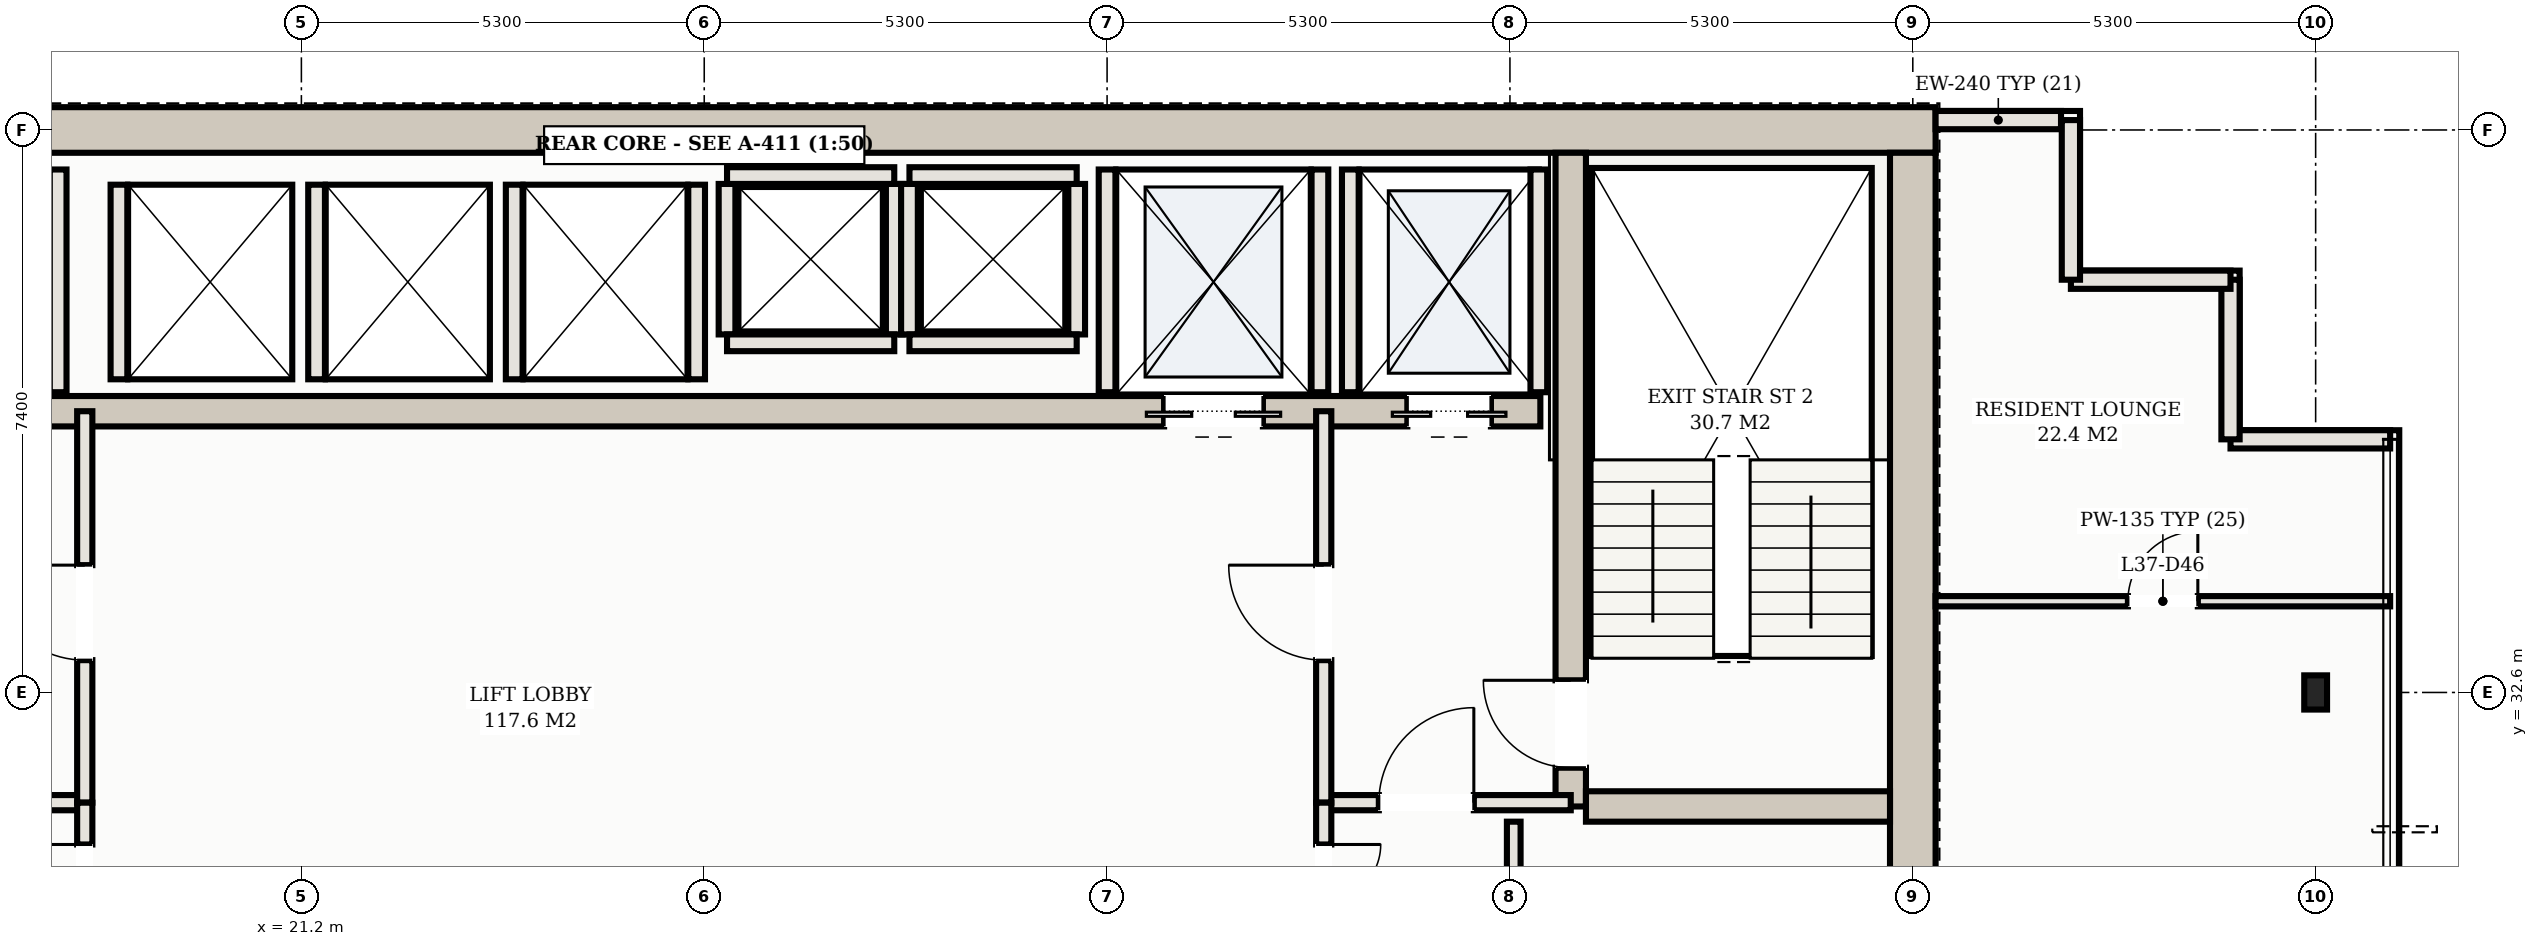
"""IFC4 building model, lengths in metres.
Left out: names, types, materials, properties, quantities, classifications, styles, units other than length and angle.
Written with IfcOpenShell. Run it as: python <this file> out.ifc"""

import sys

from ifc_helpers import new_model, si_unit, direction, frame, frame_2d, origin, origin_2d, place, context, subcontext, project, spatial, rectangle, hollow_rectangle, extrude, element, fill, save


model = new_model("IFC4")
c1 = context("Model", 3, precision=1e-05, world=origin(), true_north=direction((0.0, 1.0)))
c2 = subcontext(c1, "Body", "Model", "MODEL_VIEW")
j1 = project(units=[si_unit("LENGTHUNIT", "METRE"), si_unit("PLANEANGLEUNIT", "RADIAN")], contexts=[c1])
p1 = place(None, origin())
s1 = spatial("IfcSite", under=j1, at=p1, CompositionType="ELEMENT")
p2 = place(p1, origin())
s2 = spatial("IfcBuilding", under=s1, at=p2, CompositionType="ELEMENT")
p3 = place(p2, frame((0.0, 0.0, 139.2)))
s3 = spatial("IfcBuildingStorey", under=s2, at=p3, CompositionType="ELEMENT", Elevation=139.2)
p4 = place(p3, frame((10.3, 40.0, 0.0), z_axis=(0.0, 0.0, 1.0), x_axis=(1.0, 0.0, 0.0)))
e1 = element("IfcWall", 1, at=p4, inside=s3, PredefinedType="SHEAR", context=c2, shape_type="SweptSolid", body=[
    extrude(rectangle(XDim=32.4, YDim=0.6, at=frame_2d((16.2, 0.0))), origin(), (0.0, 0.0, 1.0), 3.1),
])
p5 = place(p3, frame((42.4, 25.5, 0.0), z_axis=(0.0, 0.0, 1.0), x_axis=(0.0, 1.0, 0.0)))
e2 = element("IfcWall", 2, at=p5, inside=s3, PredefinedType="SHEAR", context=c2, shape_type="SweptSolid", body=[
    extrude(rectangle(XDim=14.2, YDim=0.6, at=frame_2d((7.1, 0.0))), origin(), (0.0, 0.0, 1.0), 3.1),
])
p6 = place(p3, frame((37.9, 31.1, 0.0), z_axis=(0.0, 0.0, 1.0), x_axis=(0.0, 1.0, 0.0)))
e3 = element("IfcWall", 3, at=p6, inside=s3, PredefinedType="SHEAR", context=c2, shape_type="SweptSolid", body=[
    extrude(rectangle(XDim=8.6, YDim=0.4, at=frame_2d((4.3, 0.0))), origin(), (0.0, 0.0, 1.0), 3.1),
])
p7 = place(p6, frame((0.51, 0.0, 0.0)))
e4 = element("IfcOpeningElement", 4, at=p7, cuts=e3, PredefinedType="OPENING", context=c2, shape_type="SweptSolid", body=[
    extrude(rectangle(XDim=1.15, YDim=2.2, at=frame_2d((0.575, 1.1))), frame((0.0, 0.21, 0.0), z_axis=(0.0, -1.0, 0.0), x_axis=(1.0, 0.0, 0.0)), (0.0, 0.0, 1.0), 0.42),
])
p8 = place(p3, frame((38.1, 31.1, 0.0), z_axis=(0.0, 0.0, 1.0), x_axis=(1.0, 0.0, 0.0)))
e5 = element("IfcWall", 5, at=p8, inside=s3, PredefinedType="SHEAR", context=c2, shape_type="SweptSolid", body=[
    extrude(rectangle(XDim=4.0, YDim=0.4, at=frame_2d((2.0, 0.0))), origin(), (0.0, 0.0, 1.0), 3.1),
])
p9 = place(p3, frame((15.5, 36.3, 0.0), z_axis=(0.0, 0.0, 1.0), x_axis=(1.0, 0.0, 0.0)))
e6 = element("IfcWall", 6, at=p9, inside=s3, PredefinedType="SHEAR", context=c2, shape_type="SweptSolid", body=[
    extrude(rectangle(XDim=22.0, YDim=0.4, at=frame_2d((11.0, 0.0))), origin(), (0.0, 0.0, 1.0), 3.1),
])
p10 = place(p9, frame((0.65, 0.0, 0.0)))
e7 = element("IfcOpeningElement", 7, at=p10, cuts=e6, PredefinedType="OPENING", context=c2, shape_type="SweptSolid", body=[
    extrude(rectangle(XDim=1.1, YDim=2.15, at=frame_2d((0.55, 1.075))), frame((0.0, 0.21, 0.0), z_axis=(0.0, -1.0, 0.0), x_axis=(1.0, 0.0, 0.0)), (0.0, 0.0, 1.0), 0.42),
])
p11 = place(p9, frame((20.25, 0.0, 0.0)))
e8 = element("IfcOpeningElement", 8, at=p11, cuts=e6, PredefinedType="OPENING", context=c2, shape_type="SweptSolid", body=[
    extrude(rectangle(XDim=1.1, YDim=2.15, at=frame_2d((0.55, 1.075))), frame((0.0, 0.21, 0.0), z_axis=(0.0, -1.0, 0.0), x_axis=(1.0, 0.0, 0.0)), (0.0, 0.0, 1.0), 0.42),
])
p12 = place(p9, frame((17.05, 0.0, 0.0)))
e9 = element("IfcOpeningElement", 9, at=p12, cuts=e6, PredefinedType="OPENING", context=c2, shape_type="SweptSolid", body=[
    extrude(rectangle(XDim=1.3, YDim=2.2, at=frame_2d((0.65, 1.1))), frame((0.0, 0.21, 0.0), z_axis=(0.0, -1.0, 0.0), x_axis=(1.0, 0.0, 0.0)), (0.0, 0.0, 1.0), 0.42),
])
p13 = place(p3, frame((47.7, 32.6, 0.0), z_axis=(0.0, 0.0, 1.0), x_axis=(1.0, 0.0, 0.0)))
e10 = element("IfcColumn", 10, at=p13, inside=s3, PredefinedType="COLUMN", context=c2, shape_type="SweptSolid", body=[
    extrude(hollow_rectangle(XDim=0.3, YDim=0.45, WallThickness=0.016, at=origin_2d()), origin(), (0.0, 0.0, 1.0), 3.3),
])
for number, where, z_axis, x_axis in (
    (11, (18.0, 36.55, 0.0), (0.0, 0.0, 1.0), (0.0, 1.0, 0.0)),
    (12, (35.0, 36.55, 0.0), (0.0, 0.0, 1.0), (0.0, 1.0, 0.0)),
    (13, (37.48, 36.55, 0.0), (0.0, 0.0, 1.0), (0.0, 1.0, 0.0)),
    (14, (31.8, 36.55, 0.0), (0.0, 0.0, 1.0), (0.0, 1.0, 0.0)),
    (15, (34.6, 36.55, 0.0), (0.0, 0.0, 1.0), (0.0, 1.0, 0.0)),
):
    element("IfcWall", number, at=place(p3, frame(where, z_axis=z_axis, x_axis=x_axis)), inside=s3, PredefinedType="SOLIDWALL", context=c2, shape_type="SweptSolid", body=[
        extrude(rectangle(XDim=2.93, YDim=0.22, at=frame_2d((1.465, 0.0))), origin(), (0.0, 0.0, 1.0), 3.1),
    ])
for number, where, z_axis, x_axis in (
    (16, (18.8, 36.72, 0.0), (0.0, 0.0, 1.0), (0.0, 1.0, 0.0)),
    (17, (21.4, 36.72, 0.0), (0.0, 0.0, 1.0), (0.0, 1.0, 0.0)),
    (18, (24.0, 36.72, 0.0), (0.0, 0.0, 1.0), (0.0, 1.0, 0.0)),
    (19, (26.4, 36.72, 0.0), (0.0, 0.0, 1.0), (0.0, 1.0, 0.0)),
):
    element("IfcWall", number, at=place(p3, frame(where, z_axis=z_axis, x_axis=x_axis)), inside=s3, PredefinedType="SOLIDWALL", context=c2, shape_type="SweptSolid", body=[
        extrude(rectangle(XDim=2.56, YDim=0.22, at=frame_2d((1.28, 0.0))), origin(), (0.0, 0.0, 1.0), 3.1),
    ])
for number, where, z_axis, x_axis in (
    (20, (26.8, 37.31, 0.0), (0.0, 0.0, 1.0), (0.0, 1.0, 0.0)),
    (21, (29.0, 37.31, 0.0), (0.0, 0.0, 1.0), (0.0, 1.0, 0.0)),
):
    element("IfcWall", number, at=place(p3, frame(where, z_axis=z_axis, x_axis=x_axis)), inside=s3, PredefinedType="SOLIDWALL", context=c2, shape_type="SweptSolid", body=[
        extrude(rectangle(XDim=1.98, YDim=0.22, at=frame_2d((0.99, 0.0))), origin(), (0.0, 0.0, 1.0), 3.1),
    ])
for number, where, z_axis, x_axis in (
    (22, (26.8, 39.4, 0.0), (0.0, 0.0, 1.0), (1.0, 0.0, 0.0)),
    (23, (26.8, 37.2, 0.0), (0.0, 0.0, 1.0), (1.0, 0.0, 0.0)),
):
    element("IfcWall", number, at=place(p3, frame(where, z_axis=z_axis, x_axis=x_axis)), inside=s3, PredefinedType="SOLIDWALL", context=c2, shape_type="SweptSolid", body=[
        extrude(rectangle(XDim=2.2, YDim=0.22, at=frame_2d((1.1, 0.0))), origin(), (0.0, 0.0, 1.0), 3.1),
    ])
for number, where, z_axis, x_axis in (
    (24, (29.2, 37.31, 0.0), (0.0, 0.0, 1.0), (0.0, 1.0, 0.0)),
    (25, (31.4, 37.31, 0.0), (0.0, 0.0, 1.0), (0.0, 1.0, 0.0)),
):
    element("IfcWall", number, at=place(p3, frame(where, z_axis=z_axis, x_axis=x_axis)), inside=s3, PredefinedType="SOLIDWALL", context=c2, shape_type="SweptSolid", body=[
        extrude(rectangle(XDim=1.98, YDim=0.22, at=frame_2d((0.99, 0.0))), origin(), (0.0, 0.0, 1.0), 3.1),
    ])
for number, where, z_axis, x_axis in (
    (26, (29.2, 39.4, 0.0), (0.0, 0.0, 1.0), (1.0, 0.0, 0.0)),
    (27, (29.2, 37.2, 0.0), (0.0, 0.0, 1.0), (1.0, 0.0, 0.0)),
):
    element("IfcWall", number, at=place(p3, frame(where, z_axis=z_axis, x_axis=x_axis)), inside=s3, PredefinedType="SOLIDWALL", context=c2, shape_type="SweptSolid", body=[
        extrude(rectangle(XDim=2.2, YDim=0.22, at=frame_2d((1.1, 0.0))), origin(), (0.0, 0.0, 1.0), 3.1),
    ])
p14 = place(p3, frame((48.68, 35.93, 0.0), z_axis=(0.0, 0.0, 1.0), x_axis=(-1.0, 0.0, 0.0)))
e28 = element("IfcWall", 28, at=p14, inside=s3, PredefinedType="SOLIDWALL", context=c2, shape_type="SweptSolid", body=[
    extrude(rectangle(XDim=2.1, YDim=0.24, at=frame_2d((1.05, 0.0))), origin(), (0.0, 0.0, 1.0), 3.1),
])
for number, where, z_axis, x_axis in (
    (29, (46.58, 35.93, 0.0), (0.0, 0.0, 1.0), (0.0, 1.0, 0.0)),
    (30, (46.58, 38.03, 0.0), (0.0, 0.0, 1.0), (-1.0, 0.0, 0.0)),
):
    element("IfcWall", number, at=place(p3, frame(where, z_axis=z_axis, x_axis=x_axis)), inside=s3, PredefinedType="SOLIDWALL", context=c2, shape_type="SweptSolid", body=[
        extrude(rectangle(XDim=2.1, YDim=0.24, at=frame_2d((1.05, 0.0))), origin(), (0.0, 0.0, 1.0), 3.1),
    ])
p15 = place(p3, frame((44.48, 38.03, 0.0), z_axis=(0.0, 0.0, 1.0), x_axis=(0.0, 1.0, 0.0)))
e31 = element("IfcWall", 31, at=p15, inside=s3, PredefinedType="SOLIDWALL", context=c2, shape_type="SweptSolid", body=[
    extrude(rectangle(XDim=2.1, YDim=0.24, at=frame_2d((1.05, 0.0))), origin(), (0.0, 0.0, 1.0), 3.1),
])
p16 = place(p3, frame((44.35, 40.13, 0.0), z_axis=(0.0, 0.0, 1.0), x_axis=(-1.0, 0.0, 0.0)))
e32 = element("IfcWall", 32, at=p16, inside=s3, PredefinedType="SOLIDWALL", context=c2, shape_type="SweptSolid", body=[
    extrude(rectangle(XDim=1.65, YDim=0.24, at=frame_2d((0.825, 0.0))), origin(), (0.0, 0.0, 1.0), 3.1),
])
p17 = place(p3, frame((15.1, 31.15, 0.0), z_axis=(0.0, 0.0, 1.0), x_axis=(1.0, 0.0, 0.0)))
e33 = element("IfcWall", 33, at=p17, inside=s3, PredefinedType="PARTITIONING", context=c2, shape_type="SweptSolid", body=[
    extrude(rectangle(XDim=3.25, YDim=0.2, at=frame_2d((1.625, 0.0))), origin(), (0.0, 0.0, 1.0), 2.38),
])
p18 = place(p17, frame((1.275, 0.0, 0.0)))
e34 = element("IfcOpeningElement", 34, at=p18, cuts=e33, PredefinedType="OPENING", context=c2, shape_type="SweptSolid", body=[
    extrude(rectangle(XDim=1.25, YDim=2.2, at=frame_2d((0.625, 1.1))), frame((0.0, 0.11, 0.0), z_axis=(0.0, -1.0, 0.0), x_axis=(1.0, 0.0, 0.0)), (0.0, 0.0, 1.0), 0.22),
])
p19 = place(p3, frame((18.35, 31.15, 0.0), z_axis=(0.0, 0.0, 1.0), x_axis=(0.0, 1.0, 0.0)))
e35 = element("IfcWall", 35, at=p19, inside=s3, PredefinedType="PARTITIONING", context=c2, shape_type="SweptSolid", body=[
    extrude(rectangle(XDim=5.15, YDim=0.2, at=frame_2d((2.575, 0.0))), origin(), (0.0, 0.0, 1.0), 2.38),
])
p20 = place(p19, frame((1.875, 0.0, 0.0)))
e36 = element("IfcOpeningElement", 36, at=p20, cuts=e35, PredefinedType="OPENING", context=c2, shape_type="SweptSolid", body=[
    extrude(rectangle(XDim=1.25, YDim=2.2, at=frame_2d((0.625, 1.1))), frame((0.0, 0.11, 0.0), z_axis=(0.0, -1.0, 0.0), x_axis=(1.0, 0.0, 0.0)), (0.0, 0.0, 1.0), 0.22),
])
p21 = place(p3, frame((34.65, 31.15, 0.0), z_axis=(0.0, 0.0, 1.0), x_axis=(1.0, 0.0, 0.0)))
e37 = element("IfcWall", 37, at=p21, inside=s3, PredefinedType="PARTITIONING", context=c2, shape_type="SweptSolid", body=[
    extrude(rectangle(XDim=3.25, YDim=0.2, at=frame_2d((1.625, 0.0))), origin(), (0.0, 0.0, 1.0), 2.38),
])
p22 = place(p21, frame((0.725, 0.0, 0.0)))
e38 = element("IfcOpeningElement", 38, at=p22, cuts=e37, PredefinedType="OPENING", context=c2, shape_type="SweptSolid", body=[
    extrude(rectangle(XDim=1.25, YDim=2.2, at=frame_2d((0.625, 1.1))), frame((0.0, 0.11, 0.0), z_axis=(0.0, -1.0, 0.0), x_axis=(1.0, 0.0, 0.0)), (0.0, 0.0, 1.0), 0.22),
])
p23 = place(p3, frame((34.65, 31.15, 0.0), z_axis=(0.0, 0.0, 1.0), x_axis=(0.0, 1.0, 0.0)))
e39 = element("IfcWall", 39, at=p23, inside=s3, PredefinedType="PARTITIONING", context=c2, shape_type="SweptSolid", body=[
    extrude(rectangle(XDim=5.15, YDim=0.2, at=frame_2d((2.575, 0.0))), origin(), (0.0, 0.0, 1.0), 2.38),
])
p24 = place(p23, frame((1.875, 0.0, 0.0)))
e40 = element("IfcOpeningElement", 40, at=p24, cuts=e39, PredefinedType="OPENING", context=c2, shape_type="SweptSolid", body=[
    extrude(rectangle(XDim=1.25, YDim=2.2, at=frame_2d((0.625, 1.1))), frame((0.0, 0.11, 0.0), z_axis=(0.0, -1.0, 0.0), x_axis=(1.0, 0.0, 0.0)), (0.0, 0.0, 1.0), 0.22),
])
p25 = place(p3, frame((37.15, 25.5, 0.0), z_axis=(0.0, 0.0, 1.0), x_axis=(0.0, 1.0, 0.0)))
e41 = element("IfcWall", 41, at=p25, inside=s3, PredefinedType="PARTITIONING", context=c2, shape_type="SweptSolid", body=[
    extrude(rectangle(XDim=5.4, YDim=0.18, at=frame_2d((2.7, 0.0))), origin(), (0.0, 0.0, 1.0), 2.38),
])
p26 = place(p25, frame((2.24, 0.0, 0.0)))
e42 = element("IfcOpeningElement", 42, at=p26, cuts=e41, PredefinedType="OPENING", context=c2, shape_type="SweptSolid", body=[
    extrude(rectangle(XDim=0.92, YDim=2.15, at=frame_2d((0.46, 1.075))), frame((0.0, 0.1, 0.0), z_axis=(0.0, -1.0, 0.0), x_axis=(1.0, 0.0, 0.0)), (0.0, 0.0, 1.0), 0.2),
])
p27 = place(p3, frame((18.35, 28.55, 0.0), z_axis=(0.0, 0.0, 1.0), x_axis=(0.0, 1.0, 0.0)))
e43 = element("IfcWall", 43, at=p27, inside=s3, PredefinedType="PARTITIONING", context=c2, shape_type="SweptSolid", body=[
    extrude(rectangle(XDim=2.6, YDim=0.2, at=frame_2d((1.3, 0.0))), origin(), (0.0, 0.0, 1.0), 2.38),
])
p28 = place(p27, frame((0.55, 0.0, 0.0)))
e44 = element("IfcOpeningElement", 44, at=p28, cuts=e43, PredefinedType="OPENING", context=c2, shape_type="SweptSolid", body=[
    extrude(rectangle(XDim=1.5, YDim=2.25, at=frame_2d((0.75, 1.125))), frame((0.0, 0.11, 0.0), z_axis=(0.0, -1.0, 0.0), x_axis=(1.0, 0.0, 0.0)), (0.0, 0.0, 1.0), 0.22),
])
p29 = place(p3, frame((34.65, 28.55, 0.0), z_axis=(0.0, 0.0, 1.0), x_axis=(0.0, 1.0, 0.0)))
e45 = element("IfcWall", 45, at=p29, inside=s3, PredefinedType="PARTITIONING", context=c2, shape_type="SweptSolid", body=[
    extrude(rectangle(XDim=2.6, YDim=0.2, at=frame_2d((1.3, 0.0))), origin(), (0.0, 0.0, 1.0), 2.38),
])
p30 = place(p29, frame((0.55, 0.0, 0.0)))
e46 = element("IfcOpeningElement", 46, at=p30, cuts=e45, PredefinedType="OPENING", context=c2, shape_type="SweptSolid", body=[
    extrude(rectangle(XDim=1.5, YDim=2.25, at=frame_2d((0.75, 1.125))), frame((0.0, 0.11, 0.0), z_axis=(0.0, -1.0, 0.0), x_axis=(1.0, 0.0, 0.0)), (0.0, 0.0, 1.0), 0.22),
])
p31 = place(p3, frame((42.7, 33.8, 0.0), z_axis=(0.0, 0.0, 1.0), x_axis=(1.0, 0.0, 0.0)))
e47 = element("IfcWall", 47, at=p31, inside=s3, PredefinedType="PARTITIONING", context=c2, shape_type="SweptSolid", body=[
    extrude(rectangle(XDim=5.98, YDim=0.135, at=frame_2d((2.99, 0.0))), origin(), (0.0, 0.0, 1.0), 2.38),
])
p32 = place(p31, frame((2.53, 0.0, 0.0)))
e48 = element("IfcOpeningElement", 48, at=p32, cuts=e47, PredefinedType="OPENING", context=c2, shape_type="SweptSolid", body=[
    extrude(rectangle(XDim=0.92, YDim=2.15, at=frame_2d((0.46, 1.075))), frame((0.0, 0.078, 0.0), z_axis=(0.0, -1.0, 0.0), x_axis=(1.0, 0.0, 0.0)), (0.0, 0.0, 1.0), 0.155),
])
p33 = place(p11, frame((1.1, 0.0, 0.0), z_axis=(0.0, 0.0, 1.0), x_axis=(-1.0, 0.0, 0.0)))
e49 = element("IfcDoor", 49, at=p33, inside=s3, OperationType="DOUBLE_DOOR_SLIDING", PredefinedType="DOOR", context=c2, shape_type="SweptSolid", body=[
    extrude(rectangle(XDim=1.1, YDim=2.15, at=frame_2d((0.55, 1.075))), frame((0.0, 0.025, 0.0), z_axis=(0.0, -1.0, 0.0), x_axis=(1.0, 0.0, 0.0)), (0.0, 0.0, 1.0), 0.05),
])
fill(e8, e49)
p34 = place(p12, frame((1.3, 0.0, 0.0), z_axis=(0.0, 0.0, 1.0), x_axis=(-1.0, 0.0, 0.0)))
e50 = element("IfcDoor", 50, at=p34, inside=s3, OperationType="DOUBLE_DOOR_SLIDING", PredefinedType="DOOR", context=c2, shape_type="SweptSolid", body=[
    extrude(rectangle(XDim=1.3, YDim=2.2, at=frame_2d((0.65, 1.1))), frame((0.0, 0.025, 0.0), z_axis=(0.0, -1.0, 0.0), x_axis=(1.0, 0.0, 0.0)), (0.0, 0.0, 1.0), 0.05),
])
fill(e9, e50)
p35 = place(p20, origin())
e51 = element("IfcDoor", 51, at=p35, inside=s3, OperationType="SINGLE_SWING_RIGHT", PredefinedType="DOOR", context=c2, shape_type="SweptSolid", body=[
    extrude(rectangle(XDim=1.25, YDim=2.2, at=frame_2d((0.625, 1.1))), frame((0.0, 0.025, 0.0), z_axis=(0.0, -1.0, 0.0), x_axis=(1.0, 0.0, 0.0)), (0.0, 0.0, 1.0), 0.05),
])
fill(e36, e51)
p36 = place(p22, origin())
e52 = element("IfcDoor", 52, at=p36, inside=s3, OperationType="SINGLE_SWING_RIGHT", PredefinedType="DOOR", context=c2, shape_type="SweptSolid", body=[
    extrude(rectangle(XDim=1.25, YDim=2.2, at=frame_2d((0.625, 1.1))), frame((0.0, 0.025, 0.0), z_axis=(0.0, -1.0, 0.0), x_axis=(1.0, 0.0, 0.0)), (0.0, 0.0, 1.0), 0.05),
])
fill(e38, e52)
p37 = place(p24, origin())
e53 = element("IfcDoor", 53, at=p37, inside=s3, OperationType="SINGLE_SWING_RIGHT", PredefinedType="DOOR", context=c2, shape_type="SweptSolid", body=[
    extrude(rectangle(XDim=1.25, YDim=2.2, at=frame_2d((0.625, 1.1))), frame((0.0, 0.025, 0.0), z_axis=(0.0, -1.0, 0.0), x_axis=(1.0, 0.0, 0.0)), (0.0, 0.0, 1.0), 0.05),
])
fill(e40, e53)
p38 = place(p7, origin())
e54 = element("IfcDoor", 54, at=p38, inside=s3, OperationType="SINGLE_SWING_RIGHT", PredefinedType="DOOR", context=c2, shape_type="SweptSolid", body=[
    extrude(rectangle(XDim=1.15, YDim=2.2, at=frame_2d((0.575, 1.1))), frame((0.0, 0.025, 0.0), z_axis=(0.0, -1.0, 0.0), x_axis=(1.0, 0.0, 0.0)), (0.0, 0.0, 1.0), 0.05),
])
fill(e4, e54)
p39 = place(p28, origin())
e55 = element("IfcDoor", 55, at=p39, inside=s3, OperationType="DOUBLE_DOOR_SINGLE_SWING", PredefinedType="DOOR", context=c2, shape_type="SweptSolid", body=[
    extrude(rectangle(XDim=1.5, YDim=2.25, at=frame_2d((0.75, 1.125))), frame((0.0, 0.025, 0.0), z_axis=(0.0, -1.0, 0.0), x_axis=(1.0, 0.0, 0.0)), (0.0, 0.0, 1.0), 0.05),
])
fill(e44, e55)
p40 = place(p30, frame((1.5, 0.0, 0.0), z_axis=(0.0, 0.0, 1.0), x_axis=(-1.0, 0.0, 0.0)))
e56 = element("IfcDoor", 56, at=p40, inside=s3, OperationType="DOUBLE_DOOR_SINGLE_SWING", PredefinedType="DOOR", context=c2, shape_type="SweptSolid", body=[
    extrude(rectangle(XDim=1.5, YDim=2.25, at=frame_2d((0.75, 1.125))), frame((0.0, 0.025, 0.0), z_axis=(0.0, -1.0, 0.0), x_axis=(1.0, 0.0, 0.0)), (0.0, 0.0, 1.0), 0.05),
])
fill(e46, e56)
p41 = place(p32, origin())
e57 = element("IfcDoor", 57, at=p41, inside=s3, OperationType="SINGLE_SWING_RIGHT", PredefinedType="DOOR", context=c2, shape_type="SweptSolid", body=[
    extrude(rectangle(XDim=0.92, YDim=2.15, at=frame_2d((0.46, 1.075))), frame((0.0, 0.025, 0.0), z_axis=(0.0, -1.0, 0.0), x_axis=(1.0, 0.0, 0.0)), (0.0, 0.0, 1.0), 0.05),
])
fill(e48, e57)
save(model, sys.argv[1])
